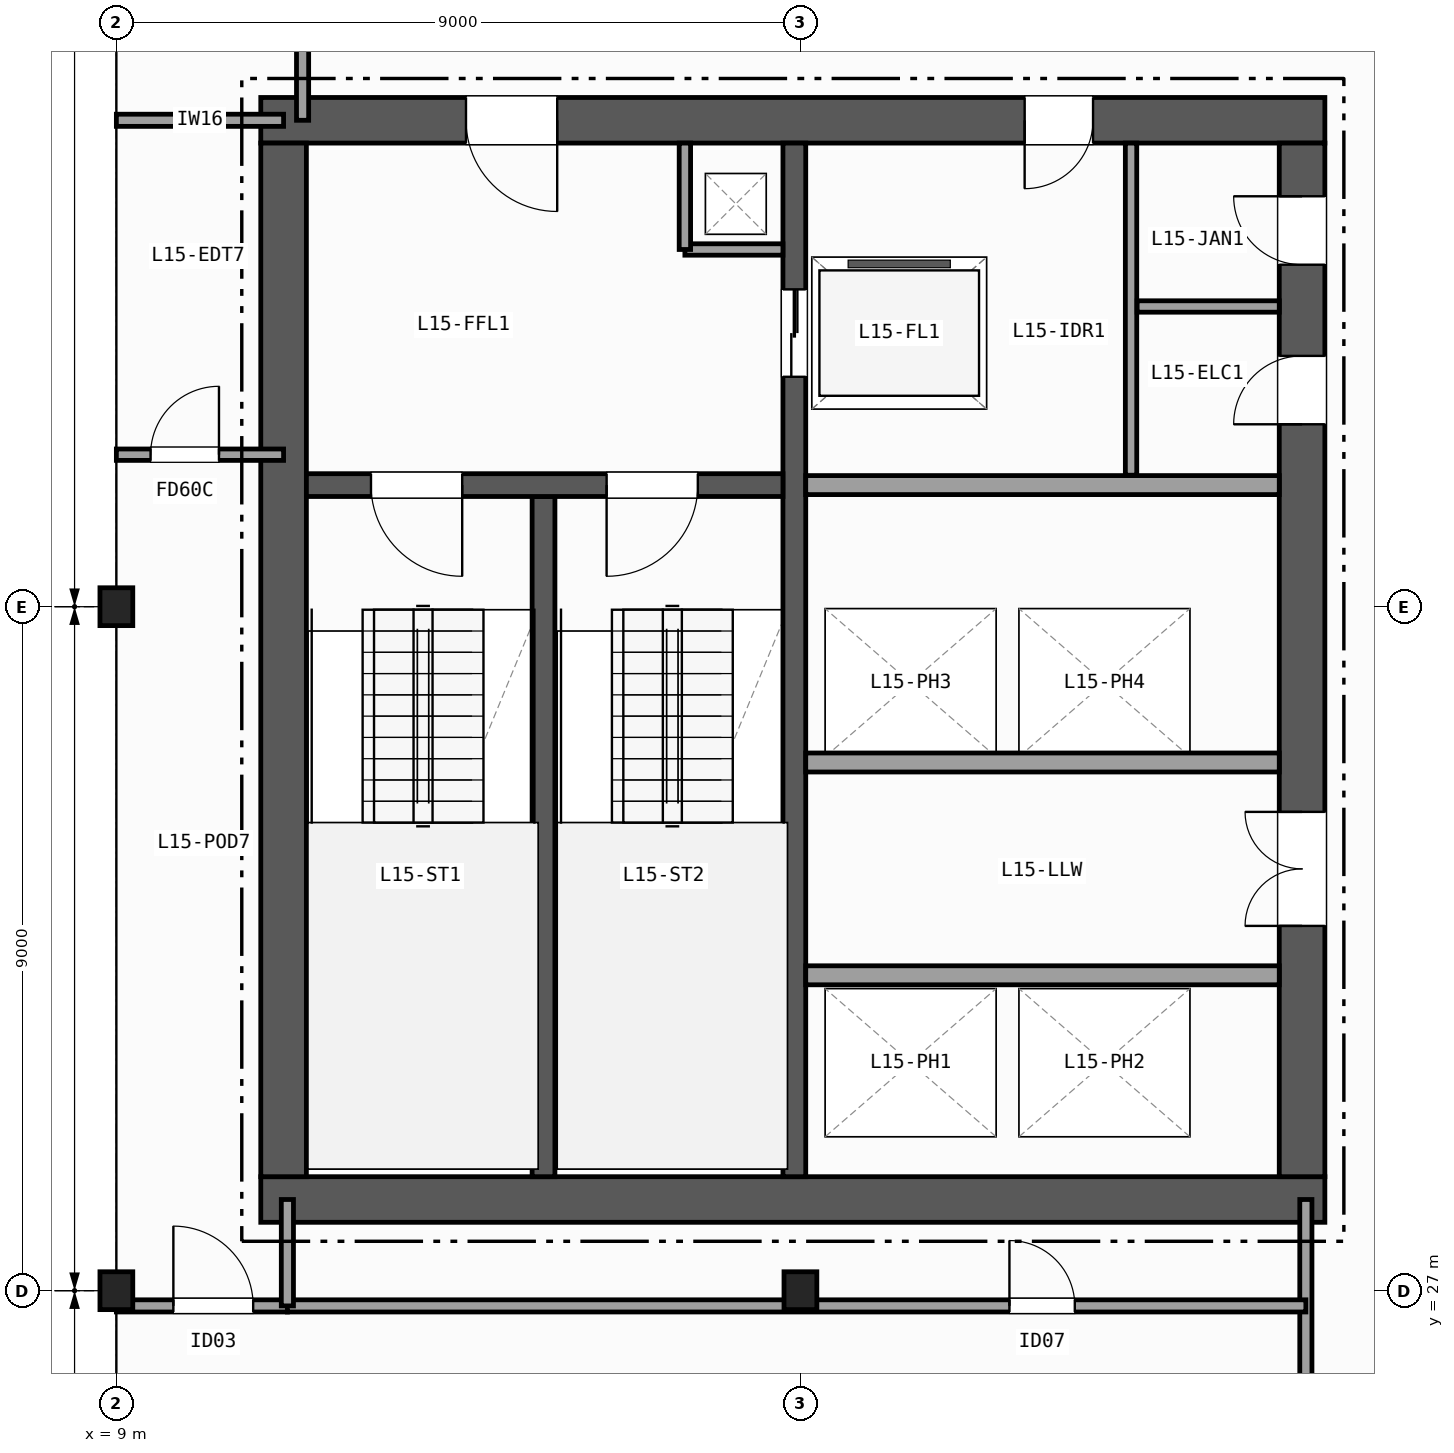
"""IFC4 building model, lengths in metres.
Left out: names, types, materials, properties, quantities, classifications, styles, units other than length and angle.
Written with IfcOpenShell. Run it as: python <this file> out.ifc"""

import sys

from ifc_helpers import new_model, si_unit, direction, frame, frame_2d, origin, origin_2d, place, context, subcontext, project, spatial, rectangle, i_section, extrude, element, fill, save


model = new_model("IFC4")
c1 = context("Model", 3, precision=1e-05, world=origin(), true_north=direction((0.0, 1.0)))
c2 = subcontext(c1, "Body", "Model", "MODEL_VIEW")
j1 = project(units=[si_unit("LENGTHUNIT", "METRE"), si_unit("PLANEANGLEUNIT", "RADIAN")], contexts=[c1])
p1 = place(None, origin())
s1 = spatial("IfcSite", under=j1, at=p1, CompositionType="ELEMENT")
p2 = place(p1, origin())
s2 = spatial("IfcBuilding", under=s1, at=p2, CompositionType="ELEMENT")
p3 = place(p2, frame((0.0, 0.0, 65.6)))
s3 = spatial("IfcBuildingStorey", under=s2, at=p3, CompositionType="ELEMENT", Elevation=65.6)
for number, where, z_axis, x_axis in (
    (1, (9.0, 27.0, 0.0), (0.0, 0.0, 1.0), (1.0, 0.0, 0.0)),
    (2, (9.0, 36.0, 0.0), (0.0, 0.0, 1.0), (1.0, 0.0, 0.0)),
    (3, (18.0, 27.0, 0.0), (0.0, 0.0, 1.0), (1.0, 0.0, 0.0)),
):
    element("IfcColumn", number, at=place(p3, frame(where, z_axis=z_axis, x_axis=x_axis)), inside=s3, PredefinedType="COLUMN", context=c2, shape_type="SweptSolid", body=[
        extrude(i_section(OverallWidth=0.432, OverallDepth=0.498, WebThickness=0.056, FlangeThickness=0.089, FilletRadius=0.015, at=origin_2d()), origin(), (0.0, 0.0, 1.0), 3.7),
    ])
p4 = place(p3, frame((10.9, 28.2, 0.0), z_axis=(0.0, 0.0, 1.0), x_axis=(1.0, 0.0, 0.0)))
e4 = element("IfcWall", 4, at=p4, inside=s3, PredefinedType="SHEAR", context=c2, shape_type="SweptSolid", body=[
    extrude(rectangle(XDim=14.0, YDim=0.6, at=frame_2d((7.0, 0.0))), origin(), (0.0, 0.0, 1.0), 3.42),
])
p5 = place(p3, frame((24.9, 42.4, 0.0), z_axis=(0.0, 0.0, 1.0), x_axis=(-1.0, 0.0, 0.0)))
e5 = element("IfcWall", 5, at=p5, inside=s3, PredefinedType="SHEAR", context=c2, shape_type="SweptSolid", body=[
    extrude(rectangle(XDim=14.0, YDim=0.6, at=frame_2d((7.0, 0.0))), origin(), (0.0, 0.0, 1.0), 3.42),
])
p6 = place(p5, frame((10.1, 0.0, 0.0)))
e6 = element("IfcOpeningElement", 6, at=p6, cuts=e5, PredefinedType="OPENING", context=c2, shape_type="SweptSolid", body=[
    extrude(rectangle(XDim=1.2, YDim=2.15, at=frame_2d((0.6, 1.075))), frame((0.0, 0.31, 0.0), z_axis=(0.0, -1.0, 0.0), x_axis=(1.0, 0.0, 0.0)), (0.0, 0.0, 1.0), 0.62),
])
p7 = place(p5, frame((3.05, 0.0, 0.0)))
e7 = element("IfcOpeningElement", 7, at=p7, cuts=e5, PredefinedType="OPENING", context=c2, shape_type="SweptSolid", body=[
    extrude(rectangle(XDim=0.9, YDim=2.1, at=frame_2d((0.45, 1.05))), frame((0.0, 0.31, 0.0), z_axis=(0.0, -1.0, 0.0), x_axis=(1.0, 0.0, 0.0)), (0.0, 0.0, 1.0), 0.62),
])
p8 = place(p3, frame((11.2, 42.1, 0.0), z_axis=(0.0, 0.0, 1.0), x_axis=(0.0, -1.0, 0.0)))
e8 = element("IfcWall", 8, at=p8, inside=s3, PredefinedType="SHEAR", context=c2, shape_type="SweptSolid", body=[
    extrude(rectangle(XDim=13.6, YDim=0.6, at=frame_2d((6.8, 0.0))), origin(), (0.0, 0.0, 1.0), 3.42),
])
p9 = place(p3, frame((24.6, 28.5, 0.0), z_axis=(0.0, 0.0, 1.0), x_axis=(0.0, 1.0, 0.0)))
e9 = element("IfcWall", 9, at=p9, inside=s3, PredefinedType="SHEAR", context=c2, shape_type="SweptSolid", body=[
    extrude(rectangle(XDim=13.6, YDim=0.6, at=frame_2d((6.8, 0.0))), origin(), (0.0, 0.0, 1.0), 3.42),
])
p10 = place(p9, frame((3.3, 0.0, 0.0)))
e10 = element("IfcOpeningElement", 10, at=p10, cuts=e9, PredefinedType="OPENING", context=c2, shape_type="SweptSolid", body=[
    extrude(rectangle(XDim=1.5, YDim=2.2, at=frame_2d((0.75, 1.1))), frame((0.0, 0.31, 0.0), z_axis=(0.0, -1.0, 0.0), x_axis=(1.0, 0.0, 0.0)), (0.0, 0.0, 1.0), 0.62),
])
p11 = place(p9, frame((9.9, 0.0, 0.0)))
e11 = element("IfcOpeningElement", 11, at=p11, cuts=e9, PredefinedType="OPENING", context=c2, shape_type="SweptSolid", body=[
    extrude(rectangle(XDim=0.9, YDim=2.1, at=frame_2d((0.45, 1.05))), frame((0.0, 0.31, 0.0), z_axis=(0.0, -1.0, 0.0), x_axis=(1.0, 0.0, 0.0)), (0.0, 0.0, 1.0), 0.62),
])
p12 = place(p9, frame((12.0, 0.0, 0.0)))
e12 = element("IfcOpeningElement", 12, at=p12, cuts=e9, PredefinedType="OPENING", context=c2, shape_type="SweptSolid", body=[
    extrude(rectangle(XDim=0.9, YDim=2.1, at=frame_2d((0.45, 1.05))), frame((0.0, 0.31, 0.0), z_axis=(0.0, -1.0, 0.0), x_axis=(1.0, 0.0, 0.0)), (0.0, 0.0, 1.0), 0.62),
])
p13 = place(p3, frame((14.62, 28.5, 0.0), z_axis=(0.0, 0.0, 1.0), x_axis=(0.0, 1.0, 0.0)))
e13 = element("IfcWall", 13, at=p13, inside=s3, PredefinedType="SHEAR", context=c2, shape_type="SweptSolid", body=[
    extrude(rectangle(XDim=8.95, YDim=0.3, at=frame_2d((4.475, 0.0))), origin(), (0.0, 0.0, 1.0), 3.42),
])
p14 = place(p3, frame((17.92, 42.1, 0.0), z_axis=(0.0, 0.0, 1.0), x_axis=(0.0, -1.0, 0.0)))
e14 = element("IfcWall", 14, at=p14, inside=s3, PredefinedType="SHEAR", context=c2, shape_type="SweptSolid", body=[
    extrude(rectangle(XDim=13.6, YDim=0.3, at=frame_2d((6.8, 0.0))), origin(), (0.0, 0.0, 1.0), 3.42),
])
p15 = place(p14, frame((1.925, 0.0, 0.0)))
e15 = element("IfcOpeningElement", 15, at=p15, cuts=e14, PredefinedType="OPENING", context=c2, shape_type="SweptSolid", body=[
    extrude(rectangle(XDim=1.15, YDim=2.15, at=frame_2d((0.575, 1.075))), frame((0.0, 0.16, 0.0), z_axis=(0.0, -1.0, 0.0), x_axis=(1.0, 0.0, 0.0)), (0.0, 0.0, 1.0), 0.32),
])
p16 = place(p3, frame((17.77, 37.6, 0.0), z_axis=(0.0, 0.0, 1.0), x_axis=(-1.0, 0.0, 0.0)))
e16 = element("IfcWall", 16, at=p16, inside=s3, PredefinedType="SHEAR", context=c2, shape_type="SweptSolid", body=[
    extrude(rectangle(XDim=6.27, YDim=0.3, at=frame_2d((3.135, 0.0))), origin(), (0.0, 0.0, 1.0), 3.42),
])
p17 = place(p16, frame((4.22, 0.0, 0.0)))
e17 = element("IfcOpeningElement", 17, at=p17, cuts=e16, PredefinedType="OPENING", context=c2, shape_type="SweptSolid", body=[
    extrude(rectangle(XDim=1.2, YDim=2.15, at=frame_2d((0.6, 1.075))), frame((0.0, 0.16, 0.0), z_axis=(0.0, -1.0, 0.0), x_axis=(1.0, 0.0, 0.0)), (0.0, 0.0, 1.0), 0.32),
])
p18 = place(p16, frame((1.12, 0.0, 0.0)))
e18 = element("IfcOpeningElement", 18, at=p18, cuts=e16, PredefinedType="OPENING", context=c2, shape_type="SweptSolid", body=[
    extrude(rectangle(XDim=1.2, YDim=2.15, at=frame_2d((0.6, 1.075))), frame((0.0, 0.16, 0.0), z_axis=(0.0, -1.0, 0.0), x_axis=(1.0, 0.0, 0.0)), (0.0, 0.0, 1.0), 0.32),
])
p19 = place(p3, frame((16.48, 40.7, 0.0), z_axis=(0.0, 0.0, 1.0), x_axis=(1.0, 0.0, 0.0)))
e19 = element("IfcWall", 19, at=p19, inside=s3, PredefinedType="PARTITIONING", context=c2, shape_type="SweptSolid", body=[
    extrude(rectangle(XDim=1.29, YDim=0.15, at=frame_2d((0.645, 0.0))), origin(), (0.0, 0.0, 1.0), 3.42),
])
p20 = place(p3, frame((16.48, 40.7, 0.0), z_axis=(0.0, 0.0, 1.0), x_axis=(0.0, 1.0, 0.0)))
e20 = element("IfcWall", 20, at=p20, inside=s3, PredefinedType="PARTITIONING", context=c2, shape_type="SweptSolid", body=[
    extrude(rectangle(XDim=1.4, YDim=0.15, at=frame_2d((0.7, 0.0))), origin(), (0.0, 0.0, 1.0), 3.42),
])
for number, where, z_axis, x_axis in (
    (21, (18.07, 37.6, 0.0), (0.0, 0.0, 1.0), (1.0, 0.0, 0.0)),
    (22, (18.07, 31.15, 0.0), (0.0, 0.0, 1.0), (1.0, 0.0, 0.0)),
    (23, (24.3, 33.95, 0.0), (0.0, 0.0, 1.0), (-1.0, 0.0, 0.0)),
):
    element("IfcWall", number, at=place(p3, frame(where, z_axis=z_axis, x_axis=x_axis)), inside=s3, PredefinedType="PARTITIONING", context=c2, shape_type="SweptSolid", body=[
        extrude(rectangle(XDim=6.23, YDim=0.25, at=frame_2d((3.115, 0.0))), origin(), (0.0, 0.0, 1.0), 3.42),
    ])
p21 = place(p3, frame((22.35, 37.73, 0.0), z_axis=(0.0, 0.0, 1.0), x_axis=(0.0, 1.0, 0.0)))
e24 = element("IfcWall", 24, at=p21, inside=s3, PredefinedType="PARTITIONING", context=c2, shape_type="SweptSolid", body=[
    extrude(rectangle(XDim=4.37, YDim=0.15, at=frame_2d((2.185, 0.0))), origin(), (0.0, 0.0, 1.0), 3.42),
])
p22 = place(p3, frame((22.43, 39.95, 0.0), z_axis=(0.0, 0.0, 1.0), x_axis=(1.0, 0.0, 0.0)))
e25 = element("IfcWall", 25, at=p22, inside=s3, PredefinedType="PARTITIONING", context=c2, shape_type="SweptSolid", body=[
    extrude(rectangle(XDim=1.87, YDim=0.15, at=frame_2d((0.935, 0.0))), origin(), (0.0, 0.0, 1.0), 3.42),
])
p23 = place(p3, frame((9.0, 26.8, 0.0), z_axis=(0.0, 0.0, 1.0), x_axis=(1.0, 0.0, 0.0)))
e26 = element("IfcWall", 26, at=p23, inside=s3, PredefinedType="PARTITIONING", context=c2, shape_type="SweptSolid", body=[
    extrude(rectangle(XDim=2.25, YDim=0.16, at=frame_2d((1.125, 0.0))), origin(), (0.0, 0.0, 1.0), 2.627),
])
p24 = place(p23, frame((0.75, 0.0, 0.0)))
e27 = element("IfcOpeningElement", 27, at=p24, cuts=e26, PredefinedType="OPENING", context=c2, shape_type="SweptSolid", body=[
    extrude(rectangle(XDim=1.05, YDim=2.15, at=frame_2d((0.525, 1.075))), frame((0.0, 0.09, 0.0), z_axis=(0.0, -1.0, 0.0), x_axis=(1.0, 0.0, 0.0)), (0.0, 0.0, 1.0), 0.18),
])
p25 = place(p3, frame((9.0, 42.4, 0.0), z_axis=(0.0, 0.0, 1.0), x_axis=(1.0, 0.0, 0.0)))
e28 = element("IfcWall", 28, at=p25, inside=s3, PredefinedType="PARTITIONING", context=c2, shape_type="SweptSolid", body=[
    extrude(rectangle(XDim=2.2, YDim=0.16, at=frame_2d((1.1, 0.0))), origin(), (0.0, 0.0, 1.0), 2.627),
])
p26 = place(p3, frame((11.45, 42.4, 0.0), z_axis=(0.0, 0.0, 1.0), x_axis=(0.0, 1.0, 0.0)))
e29 = element("IfcWall", 29, at=p26, inside=s3, PredefinedType="PARTITIONING", context=c2, shape_type="SweptSolid", body=[
    extrude(rectangle(XDim=2.1, YDim=0.16, at=frame_2d((1.05, 0.0))), origin(), (0.0, 0.0, 1.0), 3.42),
])
p27 = place(p3, frame((9.0, 38.0, 0.0), z_axis=(0.0, 0.0, 1.0), x_axis=(1.0, 0.0, 0.0)))
e30 = element("IfcWall", 30, at=p27, inside=s3, PredefinedType="PARTITIONING", context=c2, shape_type="SweptSolid", body=[
    extrude(rectangle(XDim=2.2, YDim=0.15, at=frame_2d((1.1, 0.0))), origin(), (0.0, 0.0, 1.0), 2.627),
])
p28 = place(p27, frame((0.45, 0.0, 0.0)))
e31 = element("IfcOpeningElement", 31, at=p28, cuts=e30, PredefinedType="OPENING", context=c2, shape_type="SweptSolid", body=[
    extrude(rectangle(XDim=0.9, YDim=2.1, at=frame_2d((0.45, 1.05))), frame((0.0, 0.085, 0.0), z_axis=(0.0, -1.0, 0.0), x_axis=(1.0, 0.0, 0.0)), (0.0, 0.0, 1.0), 0.17),
])
p29 = place(p3, frame((24.65, 9.0, 0.0), z_axis=(0.0, 0.0, 1.0), x_axis=(0.0, 1.0, 0.0)))
e32 = element("IfcWall", 32, at=p29, inside=s3, PredefinedType="PARTITIONING", context=c2, shape_type="SweptSolid", body=[
    extrude(rectangle(XDim=19.2, YDim=0.16, at=frame_2d((9.6, 0.0))), origin(), (0.0, 0.0, 1.0), 2.627),
])
p30 = place(p29, frame((2.8, 0.0, 0.0)))
e33 = element("IfcOpeningElement", 33, at=p30, cuts=e32, PredefinedType="OPENING", context=c2, shape_type="SweptSolid", body=[
    extrude(rectangle(XDim=0.95, YDim=2.1, at=frame_2d((0.475, 1.05))), frame((0.0, 0.09, 0.0), z_axis=(0.0, -1.0, 0.0), x_axis=(1.0, 0.0, 0.0)), (0.0, 0.0, 1.0), 0.18),
])
p31 = place(p29, frame((10.59, 0.0, 0.0)))
e34 = element("IfcOpeningElement", 34, at=p31, cuts=e32, PredefinedType="OPENING", context=c2, shape_type="SweptSolid", body=[
    extrude(rectangle(XDim=1.0, YDim=2.1, at=frame_2d((0.5, 1.05))), frame((0.0, 0.09, 0.0), z_axis=(0.0, -1.0, 0.0), x_axis=(1.0, 0.0, 0.0)), (0.0, 0.0, 1.0), 0.18),
])
p32 = place(p3, frame((11.25, 26.8, 0.0), z_axis=(0.0, 0.0, 1.0), x_axis=(1.0, 0.0, 0.0)))
e35 = element("IfcWall", 35, at=p32, inside=s3, PredefinedType="PARTITIONING", context=c2, shape_type="SweptSolid", body=[
    extrude(rectangle(XDim=13.4, YDim=0.16, at=frame_2d((6.7, 0.0))), origin(), (0.0, 0.0, 1.0), 2.789),
])
p33 = place(p32, frame((9.5, 0.0, 0.0)))
e36 = element("IfcOpeningElement", 36, at=p33, cuts=e35, PredefinedType="OPENING", context=c2, shape_type="SweptSolid", body=[
    extrude(rectangle(XDim=0.86, YDim=2.05, at=frame_2d((0.43, 1.025))), frame((0.0, 0.09, 0.0), z_axis=(0.0, -1.0, 0.0), x_axis=(1.0, 0.0, 0.0)), (0.0, 0.0, 1.0), 0.18),
])
p34 = place(p3, frame((11.25, 26.8, 0.0), z_axis=(0.0, 0.0, 1.0), x_axis=(0.0, 1.0, 0.0)))
e37 = element("IfcWall", 37, at=p34, inside=s3, PredefinedType="PARTITIONING", context=c2, shape_type="SweptSolid", body=[
    extrude(rectangle(XDim=1.4, YDim=0.16, at=frame_2d((0.7, 0.0))), origin(), (0.0, 0.0, 1.0), 2.789),
])
p35 = place(p17, origin())
e38 = element("IfcDoor", 38, at=p35, inside=s3, OperationType="SINGLE_SWING_LEFT", PredefinedType="DOOR", context=c2, shape_type="SweptSolid", body=[
    extrude(rectangle(XDim=1.2, YDim=2.15, at=frame_2d((0.6, 1.075))), frame((0.0, 0.025, 0.0), z_axis=(0.0, -1.0, 0.0), x_axis=(1.0, 0.0, 0.0)), (0.0, 0.0, 1.0), 0.05),
])
fill(e17, e38)
p36 = place(p18, origin())
e39 = element("IfcDoor", 39, at=p36, inside=s3, OperationType="SINGLE_SWING_RIGHT", PredefinedType="DOOR", context=c2, shape_type="SweptSolid", body=[
    extrude(rectangle(XDim=1.2, YDim=2.15, at=frame_2d((0.6, 1.075))), frame((0.0, 0.025, 0.0), z_axis=(0.0, -1.0, 0.0), x_axis=(1.0, 0.0, 0.0)), (0.0, 0.0, 1.0), 0.05),
])
fill(e18, e39)
p37 = place(p10, origin())
e40 = element("IfcDoor", 40, at=p37, inside=s3, OperationType="DOUBLE_DOOR_SINGLE_SWING", PredefinedType="DOOR", context=c2, shape_type="SweptSolid", body=[
    extrude(rectangle(XDim=1.5, YDim=2.2, at=frame_2d((0.75, 1.1))), frame((0.0, 0.025, 0.0), z_axis=(0.0, -1.0, 0.0), x_axis=(1.0, 0.0, 0.0)), (0.0, 0.0, 1.0), 0.05),
])
fill(e10, e40)
p38 = place(p6, origin())
e41 = element("IfcDoor", 41, at=p38, inside=s3, OperationType="SINGLE_SWING_LEFT", PredefinedType="DOOR", context=c2, shape_type="SweptSolid", body=[
    extrude(rectangle(XDim=1.2, YDim=2.15, at=frame_2d((0.6, 1.075))), frame((0.0, 0.025, 0.0), z_axis=(0.0, -1.0, 0.0), x_axis=(1.0, 0.0, 0.0)), (0.0, 0.0, 1.0), 0.05),
])
fill(e6, e41)
p39 = place(p11, origin())
e42 = element("IfcDoor", 42, at=p39, inside=s3, OperationType="SINGLE_SWING_LEFT", PredefinedType="DOOR", context=c2, shape_type="SweptSolid", body=[
    extrude(rectangle(XDim=0.9, YDim=2.1, at=frame_2d((0.45, 1.05))), frame((0.0, 0.025, 0.0), z_axis=(0.0, -1.0, 0.0), x_axis=(1.0, 0.0, 0.0)), (0.0, 0.0, 1.0), 0.05),
])
fill(e11, e42)
p40 = place(p7, origin())
e43 = element("IfcDoor", 43, at=p40, inside=s3, OperationType="SINGLE_SWING_RIGHT", PredefinedType="DOOR", context=c2, shape_type="SweptSolid", body=[
    extrude(rectangle(XDim=0.9, YDim=2.1, at=frame_2d((0.45, 1.05))), frame((0.0, 0.025, 0.0), z_axis=(0.0, -1.0, 0.0), x_axis=(1.0, 0.0, 0.0)), (0.0, 0.0, 1.0), 0.05),
])
fill(e7, e43)
p41 = place(p12, origin())
e44 = element("IfcDoor", 44, at=p41, inside=s3, OperationType="SINGLE_SWING_RIGHT", PredefinedType="DOOR", context=c2, shape_type="SweptSolid", body=[
    extrude(rectangle(XDim=0.9, YDim=2.1, at=frame_2d((0.45, 1.05))), frame((0.0, 0.025, 0.0), z_axis=(0.0, -1.0, 0.0), x_axis=(1.0, 0.0, 0.0)), (0.0, 0.0, 1.0), 0.05),
])
fill(e12, e44)
p42 = place(p15, origin())
e45 = element("IfcDoor", 45, at=p42, inside=s3, OperationType="DOUBLE_DOOR_SLIDING", PredefinedType="DOOR", context=c2, shape_type="SweptSolid", body=[
    extrude(rectangle(XDim=1.15, YDim=2.15, at=frame_2d((0.575, 1.075))), frame((0.0, 0.025, 0.0), z_axis=(0.0, -1.0, 0.0), x_axis=(1.0, 0.0, 0.0)), (0.0, 0.0, 1.0), 0.05),
])
fill(e15, e45)
p43 = place(p24, origin())
e46 = element("IfcDoor", 46, at=p43, inside=s3, OperationType="SINGLE_SWING_LEFT", PredefinedType="DOOR", context=c2, shape_type="SweptSolid", body=[
    extrude(rectangle(XDim=1.05, YDim=2.15, at=frame_2d((0.525, 1.075))), frame((0.0, 0.025, 0.0), z_axis=(0.0, -1.0, 0.0), x_axis=(1.0, 0.0, 0.0)), (0.0, 0.0, 1.0), 0.05),
])
fill(e27, e46)
p44 = place(p28, origin())
e47 = element("IfcDoor", 47, at=p44, inside=s3, OperationType="SINGLE_SWING_RIGHT", PredefinedType="DOOR", context=c2, shape_type="SweptSolid", body=[
    extrude(rectangle(XDim=0.9, YDim=2.1, at=frame_2d((0.45, 1.05))), frame((0.0, 0.025, 0.0), z_axis=(0.0, -1.0, 0.0), x_axis=(1.0, 0.0, 0.0)), (0.0, 0.0, 1.0), 0.05),
])
fill(e31, e47)
p45 = place(p33, origin())
e48 = element("IfcDoor", 48, at=p45, inside=s3, OperationType="SINGLE_SWING_LEFT", PredefinedType="DOOR", context=c2, shape_type="SweptSolid", body=[
    extrude(rectangle(XDim=0.86, YDim=2.05, at=frame_2d((0.43, 1.025))), frame((0.0, 0.025, 0.0), z_axis=(0.0, -1.0, 0.0), x_axis=(1.0, 0.0, 0.0)), (0.0, 0.0, 1.0), 0.05),
])
fill(e36, e48)
save(model, sys.argv[1])
